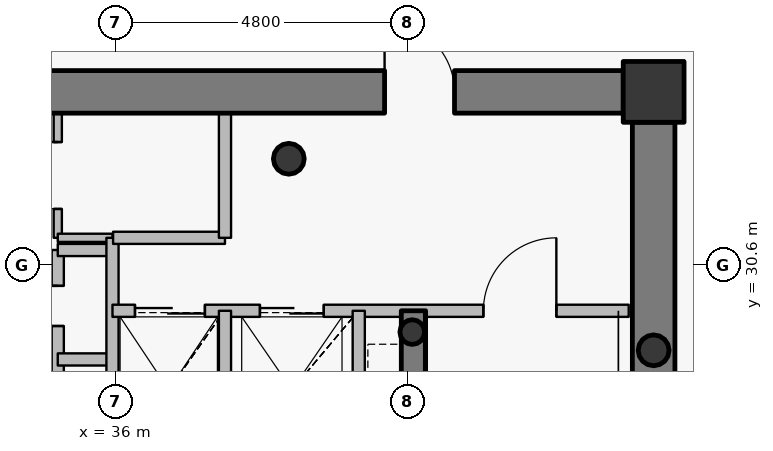
"""IFC4 building model, lengths in metres.
Left out: names, types, materials, properties, quantities, classifications, styles, units other than length and angle.
Written with IfcOpenShell. Run it as: python <this file> out.ifc"""

import sys

from ifc_helpers import new_model, si_unit, direction, frame, frame_2d, origin, origin_2d, place, context, subcontext, project, spatial, rectangle, hollow_circle, extrude, source, transform, mapped, element, fill, save


model = new_model("IFC4")
c1 = context("Model", 3, precision=1e-05, world=origin(), true_north=direction((0.0, 1.0)))
c2 = subcontext(c1, "Body", "Model", "MODEL_VIEW")
j1 = project(units=[si_unit("LENGTHUNIT", "METRE"), si_unit("PLANEANGLEUNIT", "RADIAN")], contexts=[c1])
p1 = place(None, origin())
s1 = spatial("IfcSite", under=j1, at=p1, CompositionType="ELEMENT")
p2 = place(p1, origin())
s2 = spatial("IfcBuilding", under=s1, at=p2, CompositionType="ELEMENT")
p3 = place(p2, frame((0.0, 0.0, 295.5)))
s3 = spatial("IfcBuildingStorey", under=s2, at=p3, CompositionType="ELEMENT", Elevation=295.5)
p4 = place(p3, frame((44.85, 33.45, 0.0), z_axis=(0.0, 0.0, 1.0), x_axis=(1.0, 0.0, 0.0)))
e1 = element("IfcColumn", 1, at=p4, inside=s3, PredefinedType="COLUMN", context=c2, shape_type="SweptSolid", body=[
    extrude(rectangle(XDim=1.0, YDim=1.0, at=origin_2d()), origin(), (0.0, 0.0, 1.0), 3.75),
])
p5 = place(p3, frame((38.85, 32.35, 0.0), z_axis=(0.0, 0.0, 1.0), x_axis=(1.0, 0.0, 0.0)))
e2 = element("IfcColumn", 2, at=p5, inside=s3, PredefinedType="COLUMN", context=c2, shape_type="SweptSolid", body=[
    extrude(hollow_circle(Radius=0.254, WallThickness=0.02, at=origin_2d()), origin(), (0.0, 0.0, 1.0), 3.75),
])
p6 = place(p3, frame((40.88, 29.5, 0.0), z_axis=(0.0, 0.0, 1.0), x_axis=(1.0, 0.0, 0.0)))
e3 = element("IfcColumn", 3, at=p6, inside=s3, PredefinedType="COLUMN", context=c2, shape_type="SweptSolid", body=[
    extrude(hollow_circle(Radius=0.203, WallThickness=0.016, at=origin_2d()), origin(), (0.0, 0.0, 1.0), 3.75),
])
p7 = place(p3, frame((27.65, 33.45, 0.0), z_axis=(0.0, 0.0, 1.0), x_axis=(1.0, 0.0, 0.0)))
e4 = element("IfcWall", 4, at=p7, inside=s3, PredefinedType="SHEAR", context=c2, shape_type="SweptSolid", body=[
    extrude(rectangle(XDim=16.7, YDim=0.7, at=frame_2d((8.35, 0.0))), origin(), (0.0, 0.0, 1.0), 3.05),
])
p8 = place(p7, frame((12.775, 0.0, 0.0)))
e5 = element("IfcOpeningElement", 5, at=p8, cuts=e4, PredefinedType="OPENING", context=c2, shape_type="SweptSolid", body=[
    extrude(rectangle(XDim=1.15, YDim=2.15, at=origin_2d()), frame((0.575, 0.36, 1.075), z_axis=(0.0, -1.0, 0.0), x_axis=(1.0, 0.0, 0.0)), (0.0, 0.0, 1.0), 0.72),
])
p9 = place(p3, frame((44.85, 32.95, 0.0), z_axis=(0.0, 0.0, 1.0), x_axis=(0.0, -1.0, 0.0)))
e6 = element("IfcWall", 6, at=p9, inside=s3, PredefinedType="SHEAR", context=c2, shape_type="SweptSolid", body=[
    extrude(rectangle(XDim=11.9, YDim=0.7, at=frame_2d((5.95, 0.0))), origin(), (0.0, 0.0, 1.0), 3.05),
])
p10 = place(p3, frame((40.9, 27.25, 0.0), z_axis=(0.0, 0.0, 1.0), x_axis=(0.0, 1.0, 0.0)))
e7 = element("IfcWall", 7, at=p10, inside=s3, PredefinedType="SHEAR", context=c2, shape_type="SweptSolid", body=[
    extrude(rectangle(XDim=2.6, YDim=0.4, at=frame_2d((1.3, 0.0))), origin(), (0.0, 0.0, 1.0), 3.1),
])
p11 = place(p3, frame((44.85, 29.2, 0.0), z_axis=(0.0, 0.0, 1.0), x_axis=(1.0, 0.0, 0.0)))
e8 = element("IfcColumn", 8, at=p11, inside=s3, PredefinedType="COLUMN", context=c2, shape_type="SweptSolid", body=[
    extrude(hollow_circle(Radius=0.254, WallThickness=0.02, at=origin_2d()), origin(), (0.0, 0.0, 1.0), 3.75),
])
p12 = place(p3, frame((35.05, 27.25, 0.0), z_axis=(0.0, 0.0, 1.0), x_axis=(0.0, 1.0, 0.0)))
e9 = element("IfcWall", 9, at=p12, inside=s3, PredefinedType="PARTITIONING", context=c2, shape_type="SweptSolid", body=[
    extrude(rectangle(XDim=3.6, YDim=0.2, at=frame_2d((1.8, 0.0))), origin(), (0.0, 0.0, 1.0), 3.5),
])
p13 = place(p12, frame((0.59, 0.0, 0.0)))
e10 = element("IfcOpeningElement", 10, at=p13, cuts=e9, PredefinedType="OPENING", context=c2, shape_type="SweptSolid", body=[
    extrude(rectangle(XDim=0.66, YDim=2.05, at=origin_2d()), frame((0.33, 0.11, 1.025), z_axis=(0.0, -1.0, 0.0), x_axis=(1.0, 0.0, 0.0)), (0.0, 0.0, 1.0), 0.22),
])
p14 = place(p12, frame((2.35, 0.0, 0.0)))
e11 = element("IfcOpeningElement", 11, at=p14, cuts=e9, PredefinedType="OPENING", context=c2, shape_type="SweptSolid", body=[
    extrude(rectangle(XDim=0.66, YDim=2.05, at=origin_2d()), frame((0.33, 0.11, 1.025), z_axis=(0.0, -1.0, 0.0), x_axis=(1.0, 0.0, 0.0)), (0.0, 0.0, 1.0), 0.22),
])
for number, where, z_axis, x_axis in (
    (12, (35.05, 29.05, 0.0), (0.0, 0.0, 1.0), (1.0, 0.0, 0.0)),
    (13, (35.05, 30.85, 0.0), (0.0, 0.0, 1.0), (1.0, 0.0, 0.0)),
):
    element("IfcWall", number, at=place(p3, frame(where, z_axis=z_axis, x_axis=x_axis)), inside=s3, PredefinedType="PARTITIONING", context=c2, shape_type="SweptSolid", body=[
        extrude(rectangle(XDim=0.9, YDim=0.2, at=frame_2d((0.45, 0.0))), origin(), (0.0, 0.0, 1.0), 3.5),
    ])
p15 = place(p3, frame((35.05, 31.05, 0.0), z_axis=(0.0, 0.0, 1.0), x_axis=(0.0, 1.0, 0.0)))
e14 = element("IfcWall", 14, at=p15, inside=s3, PredefinedType="PARTITIONING", context=c2, shape_type="SweptSolid", body=[
    extrude(rectangle(XDim=2.05, YDim=0.135, at=frame_2d((1.025, 0.0))), origin(), (0.0, 0.0, 1.0), 3.085),
])
p16 = place(p15, frame((0.475, 0.0, 0.0)))
e15 = element("IfcOpeningElement", 15, at=p16, cuts=e14, PredefinedType="OPENING", context=c2, shape_type="SweptSolid", body=[
    extrude(rectangle(XDim=1.1, YDim=2.15, at=origin_2d()), frame((0.55, 0.078, 1.075), z_axis=(0.0, -1.0, 0.0), x_axis=(1.0, 0.0, 0.0)), (0.0, 0.0, 1.0), 0.155),
])
p17 = place(p3, frame((35.05, 31.05, 0.0), z_axis=(0.0, 0.0, 1.0), x_axis=(1.0, 0.0, 0.0)))
e16 = element("IfcWall", 16, at=p17, inside=s3, PredefinedType="PARTITIONING", context=c2, shape_type="SweptSolid", body=[
    extrude(rectangle(XDim=0.9, YDim=0.135, at=frame_2d((0.45, 0.0))), origin(), (0.0, 0.0, 1.0), 3.5),
])
p18 = place(p3, frame((35.95, 27.25, 0.0), z_axis=(0.0, 0.0, 1.0), x_axis=(0.0, 1.0, 0.0)))
e17 = element("IfcWall", 17, at=p18, inside=s3, PredefinedType="PARTITIONING", context=c2, shape_type="SweptSolid", body=[
    extrude(rectangle(XDim=3.8, YDim=0.2, at=frame_2d((1.9, 0.0))), origin(), (0.0, 0.0, 1.0), 3.5),
])
p19 = place(p3, frame((35.95, 29.85, 0.0), z_axis=(0.0, 0.0, 1.0), x_axis=(1.0, 0.0, 0.0)))
e18 = element("IfcWall", 18, at=p19, inside=s3, PredefinedType="PARTITIONING", context=c2, shape_type="SweptSolid", body=[
    extrude(rectangle(XDim=8.49, YDim=0.2, at=frame_2d((4.245, 0.0))), origin(), (0.0, 0.0, 1.0), 3.085),
])
p20 = place(p19, frame((6.1, 0.0, 0.0)))
e19 = element("IfcOpeningElement", 19, at=p20, cuts=e18, PredefinedType="OPENING", context=c2, shape_type="SweptSolid", body=[
    extrude(rectangle(XDim=1.2, YDim=2.15, at=origin_2d()), frame((0.6, 0.11, 1.075), z_axis=(0.0, -1.0, 0.0), x_axis=(1.0, 0.0, 0.0)), (0.0, 0.0, 1.0), 0.22),
])
p21 = place(p19, frame((0.37, 0.0, 0.0)))
e20 = element("IfcOpeningElement", 20, at=p21, cuts=e18, PredefinedType="OPENING", context=c2, shape_type="SweptSolid", body=[
    extrude(rectangle(XDim=1.15, YDim=2.15, at=origin_2d()), frame((0.575, 0.11, 1.075), z_axis=(0.0, -1.0, 0.0), x_axis=(1.0, 0.0, 0.0)), (0.0, 0.0, 1.0), 0.22),
])
p22 = place(p19, frame((2.425, 0.0, 0.0)))
e21 = element("IfcOpeningElement", 21, at=p22, cuts=e18, PredefinedType="OPENING", context=c2, shape_type="SweptSolid", body=[
    extrude(rectangle(XDim=1.05, YDim=2.15, at=origin_2d()), frame((0.525, 0.11, 1.075), z_axis=(0.0, -1.0, 0.0), x_axis=(1.0, 0.0, 0.0)), (0.0, 0.0, 1.0), 0.22),
])
p23 = place(p3, frame((35.96, 31.05, 0.0), z_axis=(0.0, 0.0, 1.0), x_axis=(1.0, 0.0, 0.0)))
e22 = element("IfcWall", 22, at=p23, inside=s3, PredefinedType="PARTITIONING", context=c2, shape_type="SweptSolid", body=[
    extrude(rectangle(XDim=1.84, YDim=0.2, at=frame_2d((0.92, 0.0))), origin(), (0.0, 0.0, 1.0), 3.5),
])
p24 = place(p3, frame((37.8, 27.25, 0.0), z_axis=(0.0, 0.0, 1.0), x_axis=(0.0, 1.0, 0.0)))
e23 = element("IfcWall", 23, at=p24, inside=s3, PredefinedType="PARTITIONING", context=c2, shape_type="SweptSolid", body=[
    extrude(rectangle(XDim=2.6, YDim=0.2, at=frame_2d((1.3, 0.0))), origin(), (0.0, 0.0, 1.0), 3.5),
])
p25 = place(p3, frame((37.8, 31.05, 0.0), z_axis=(0.0, 0.0, 1.0), x_axis=(0.0, 1.0, 0.0)))
e24 = element("IfcWall", 24, at=p25, inside=s3, PredefinedType="PARTITIONING", context=c2, shape_type="SweptSolid", body=[
    extrude(rectangle(XDim=2.05, YDim=0.2, at=frame_2d((1.025, 0.0))), origin(), (0.0, 0.0, 1.0), 3.085),
])
p26 = place(p3, frame((40.0, 25.45, 0.0), z_axis=(0.0, 0.0, 1.0), x_axis=(0.0, 1.0, 0.0)))
e25 = element("IfcWall", 25, at=p26, inside=s3, PredefinedType="PARTITIONING", context=c2, shape_type="SweptSolid", body=[
    extrude(rectangle(XDim=4.4, YDim=0.2, at=frame_2d((2.2, 0.0))), origin(), (0.0, 0.0, 1.0), 3.5),
])
p27 = place(p3, frame((45.2, 33.8, 0.0), z_axis=(0.0, 0.0, 1.0), x_axis=(-1.0, 0.0, 0.0)))
e26 = element("IfcWall", 26, at=p27, inside=s3, PredefinedType="PARTITIONING", context=c2, shape_type="SweptSolid", body=[
    extrude(rectangle(XDim=0.84, YDim=0.135, at=frame_2d((0.42, 0.0))), origin(), (0.0, 0.0, 1.0), 3.035),
])
p28 = place(p3, frame((45.2, 32.96, 0.0), z_axis=(0.0, 0.0, 1.0), x_axis=(0.0, 1.0, 0.0)))
e27 = element("IfcWall", 27, at=p28, inside=s3, PredefinedType="PARTITIONING", context=c2, shape_type="SweptSolid", body=[
    extrude(rectangle(XDim=0.532, YDim=0.135, at=frame_2d((0.266, 0.0))), origin(), (0.0, 0.0, 1.0), 3.5),
])
m1 = source(origin(), c2, "Body", "SweptSolid", [
    extrude(rectangle(XDim=1.15, YDim=2.15, at=origin_2d()), frame((0.575, 0.025, 1.075), z_axis=(0.0, -1.0, 0.0), x_axis=(1.0, 0.0, 0.0)), (0.0, 0.0, 1.0), 0.05),
])
p29 = place(p8, origin())
e28 = element("IfcDoor", 28, at=p29, inside=s3, OperationType="SINGLE_SWING_LEFT", PredefinedType="DOOR", context=c2, shape_type="MappedRepresentation", body=[
    mapped(m1, transform((0.0, 0.0, 0.0), x_axis=(1.0, 0.0, 0.0), y_axis=(0.0, 1.0, 0.0), z_axis=(0.0, 0.0, 1.0), scale=1.0)),
])
fill(e5, e28)
m2 = source(origin(), c2, "Body", "SweptSolid", [
    extrude(rectangle(XDim=1.2, YDim=2.15, at=origin_2d()), frame((0.6, 0.025, 1.075), z_axis=(0.0, -1.0, 0.0), x_axis=(1.0, 0.0, 0.0)), (0.0, 0.0, 1.0), 0.05),
])
p30 = place(p20, origin())
e29 = element("IfcDoor", 29, at=p30, inside=s3, OperationType="SINGLE_SWING_RIGHT", PredefinedType="DOOR", context=c2, shape_type="MappedRepresentation", body=[
    mapped(m2, transform((0.0, 0.0, 0.0), x_axis=(1.0, 0.0, 0.0), y_axis=(0.0, 1.0, 0.0), z_axis=(0.0, 0.0, 1.0), scale=1.0)),
])
fill(e19, e29)
m3 = source(origin(), c2, "Body", "SweptSolid", [
    extrude(rectangle(XDim=1.15, YDim=2.15, at=origin_2d()), frame((0.575, 0.025, 1.075), z_axis=(0.0, -1.0, 0.0), x_axis=(1.0, 0.0, 0.0)), (0.0, 0.0, 1.0), 0.05),
])
p31 = place(p21, origin())
e30 = element("IfcDoor", 30, at=p31, inside=s3, OperationType="DOUBLE_DOOR_SLIDING", PredefinedType="USERDEFINED", context=c2, shape_type="MappedRepresentation", body=[
    mapped(m3, transform((0.0, 0.0, 0.0), x_axis=(1.0, 0.0, 0.0), y_axis=(0.0, 1.0, 0.0), z_axis=(0.0, 0.0, 1.0), scale=1.0)),
])
fill(e20, e30)
m4 = source(origin(), c2, "Body", "SweptSolid", [
    extrude(rectangle(XDim=1.05, YDim=2.15, at=origin_2d()), frame((0.525, 0.025, 1.075), z_axis=(0.0, -1.0, 0.0), x_axis=(1.0, 0.0, 0.0)), (0.0, 0.0, 1.0), 0.05),
])
p32 = place(p22, origin())
e31 = element("IfcDoor", 31, at=p32, inside=s3, OperationType="DOUBLE_DOOR_SLIDING", PredefinedType="USERDEFINED", context=c2, shape_type="MappedRepresentation", body=[
    mapped(m4, transform((0.0, 0.0, 0.0), x_axis=(1.0, 0.0, 0.0), y_axis=(0.0, 1.0, 0.0), z_axis=(0.0, 0.0, 1.0), scale=1.0)),
])
fill(e21, e31)
m5 = source(origin(), c2, "Body", "SweptSolid", [
    extrude(rectangle(XDim=0.66, YDim=2.05, at=origin_2d()), frame((0.33, 0.025, 1.025), z_axis=(0.0, -1.0, 0.0), x_axis=(1.0, 0.0, 0.0)), (0.0, 0.0, 1.0), 0.05),
])
p33 = place(p14, origin())
e32 = element("IfcDoor", 32, at=p33, inside=s3, OperationType="SINGLE_SWING_RIGHT", PredefinedType="USERDEFINED", context=c2, shape_type="MappedRepresentation", body=[
    mapped(m5, transform((0.0, 0.0, 0.0), x_axis=(1.0, 0.0, 0.0), y_axis=(0.0, 1.0, 0.0), z_axis=(0.0, 0.0, 1.0), scale=1.0)),
])
fill(e11, e32)
m6 = source(origin(), c2, "Body", "SweptSolid", [
    extrude(rectangle(XDim=1.1, YDim=2.15, at=origin_2d()), frame((0.55, 0.025, 1.075), z_axis=(0.0, -1.0, 0.0), x_axis=(1.0, 0.0, 0.0)), (0.0, 0.0, 1.0), 0.05),
])
p34 = place(p16, origin())
e33 = element("IfcDoor", 33, at=p34, inside=s3, OperationType="SINGLE_SWING_RIGHT", PredefinedType="DOOR", context=c2, shape_type="MappedRepresentation", body=[
    mapped(m6, transform((0.0, 0.0, 0.0), x_axis=(1.0, 0.0, 0.0), y_axis=(0.0, 1.0, 0.0), z_axis=(0.0, 0.0, 1.0), scale=1.0)),
])
fill(e15, e33)
save(model, sys.argv[1])
